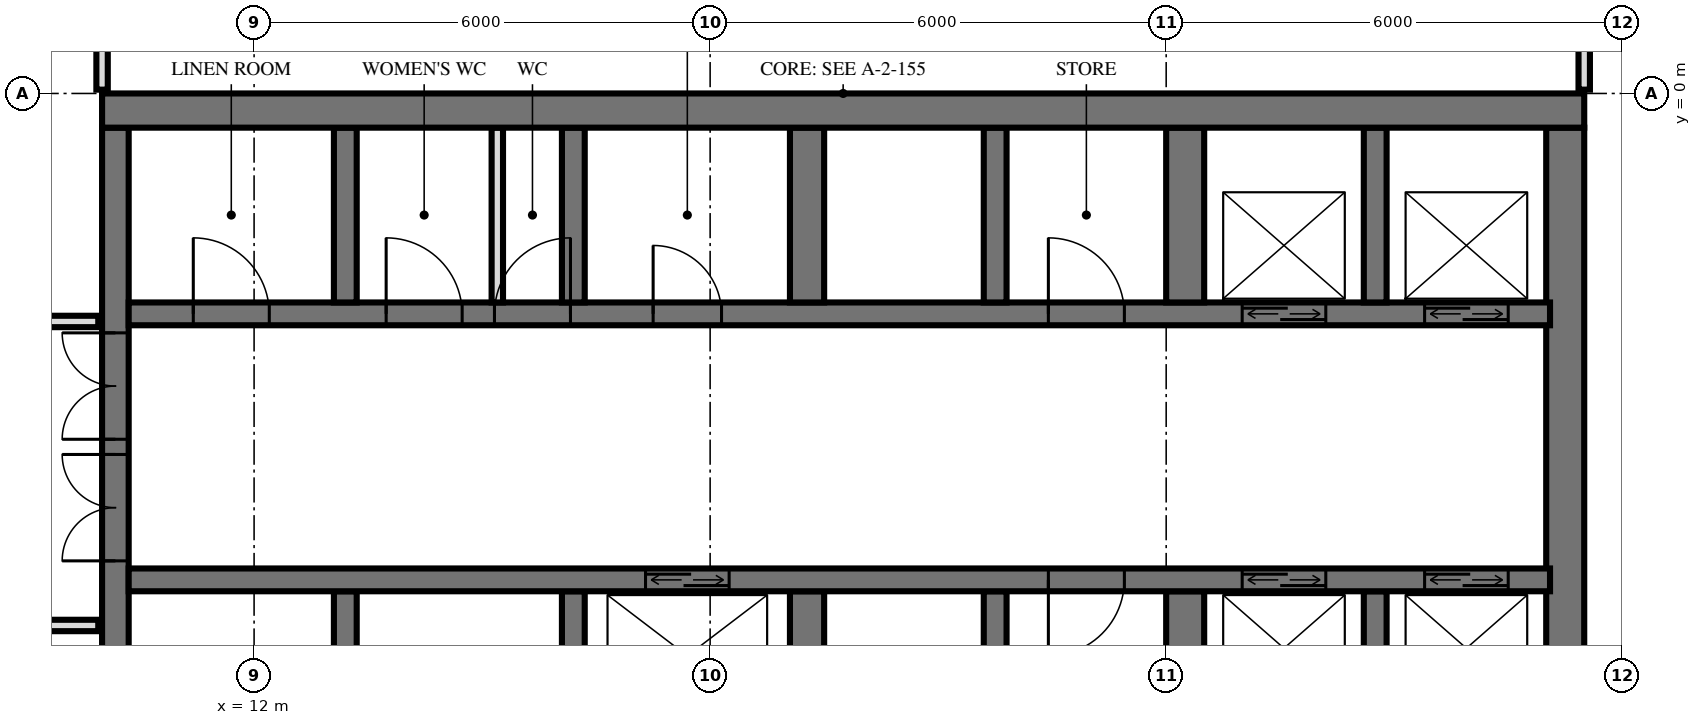
"""IFC4 building model, lengths in metres.
Left out: names, types, materials, properties, quantities, classifications, styles, units other than length and angle.
Written with IfcOpenShell. Run it as: python <this file> out.ifc"""

import sys

from ifc_helpers import new_model, si_unit, direction, frame, frame_2d, origin, place, context, subcontext, project, spatial, rectangle, extrude, element, fill, save


model = new_model("IFC4")
c1 = context("Model", 3, precision=1e-05, world=origin(), true_north=direction((0.0, 1.0)))
c2 = subcontext(c1, "Body", "Model", "MODEL_VIEW")
j1 = project(units=[si_unit("LENGTHUNIT", "METRE"), si_unit("PLANEANGLEUNIT", "RADIAN")], contexts=[c1])
p1 = place(None, origin())
s1 = spatial("IfcSite", under=j1, at=p1, CompositionType="ELEMENT")
p2 = place(p1, origin())
s2 = spatial("IfcBuilding", under=s1, at=p2, CompositionType="ELEMENT")
p3 = place(p2, frame((0.0, 0.0, 92.4)))
s3 = spatial("IfcBuildingStorey", under=s2, at=p3, CompositionType="ELEMENT", Elevation=92.4)
p4 = place(p3, frame((10.0, -0.225, 0.0), z_axis=(0.0, 0.0, 1.0), x_axis=(1.0, 0.0, 0.0)))
e1 = element("IfcWall", 1, at=p4, inside=s3, PredefinedType="SHEAR", context=c2, shape_type="SweptSolid", body=[
    extrude(rectangle(XDim=19.5, YDim=0.45, at=frame_2d((9.75, 0.0))), origin(), (0.0, 0.0, 1.0), 3.6),
])
p5 = place(p3, frame((10.175, -14.55, 0.0), z_axis=(0.0, 0.0, 1.0), x_axis=(0.0, 1.0, 0.0)))
e2 = element("IfcWall", 2, at=p5, inside=s3, PredefinedType="SHEAR", context=c2, shape_type="SweptSolid", body=[
    extrude(rectangle(XDim=14.1, YDim=0.35, at=frame_2d((7.05, 0.0))), origin(), (0.0, 0.0, 1.0), 3.6),
])
p6 = place(p5, frame((8.4, 0.0, 0.0)))
e3 = element("IfcOpeningElement", 3, at=p6, cuts=e2, PredefinedType="OPENING", context=c2, shape_type="SweptSolid", body=[
    extrude(rectangle(XDim=1.4, YDim=2.4, at=frame_2d((0.7, 1.2))), frame((0.0, 0.185, 0.0), z_axis=(0.0, -1.0, 0.0), x_axis=(1.0, 0.0, 0.0)), (0.0, 0.0, 1.0), 0.37),
])
p7 = place(p5, frame((10.0, 0.0, 0.0)))
e4 = element("IfcOpeningElement", 4, at=p7, cuts=e2, PredefinedType="OPENING", context=c2, shape_type="SweptSolid", body=[
    extrude(rectangle(XDim=1.4, YDim=2.4, at=frame_2d((0.7, 1.2))), frame((0.0, 0.185, 0.0), z_axis=(0.0, -1.0, 0.0), x_axis=(1.0, 0.0, 0.0)), (0.0, 0.0, 1.0), 0.37),
])
p8 = place(p5, frame((4.0, 0.0, 0.0)))
e5 = element("IfcOpeningElement", 5, at=p8, cuts=e2, PredefinedType="OPENING", context=c2, shape_type="SweptSolid", body=[
    extrude(rectangle(XDim=1.2, YDim=2.1, at=frame_2d((0.6, 1.05))), frame((0.0, 0.185, 0.0), z_axis=(0.0, -1.0, 0.0), x_axis=(1.0, 0.0, 0.0)), (0.0, 0.0, 1.0), 0.37),
])
p9 = place(p3, frame((29.25, -14.55, 0.0), z_axis=(0.0, 0.0, 1.0), x_axis=(0.0, 1.0, 0.0)))
e6 = element("IfcWall", 6, at=p9, inside=s3, PredefinedType="SHEAR", context=c2, shape_type="SweptSolid", body=[
    extrude(rectangle(XDim=14.1, YDim=0.5, at=frame_2d((7.05, 0.0))), origin(), (0.0, 0.0, 1.0), 3.6),
])
p10 = place(p3, frame((10.35, -2.9, 0.0), z_axis=(0.0, 0.0, 1.0), x_axis=(1.0, 0.0, 0.0)))
e7 = element("IfcWall", 7, at=p10, inside=s3, PredefinedType="SHEAR", context=c2, shape_type="SweptSolid", body=[
    extrude(rectangle(XDim=18.7, YDim=0.3, at=frame_2d((9.35, 0.0))), origin(), (0.0, 0.0, 1.0), 3.6),
])
p11 = place(p10, frame((14.65, 0.0, 0.0)))
e8 = element("IfcOpeningElement", 8, at=p11, cuts=e7, PredefinedType="OPENING", context=c2, shape_type="SweptSolid", body=[
    extrude(rectangle(XDim=1.1, YDim=2.1, at=frame_2d((0.55, 1.05))), frame((0.0, 0.16, 0.0), z_axis=(0.0, -1.0, 0.0), x_axis=(1.0, 0.0, 0.0)), (0.0, 0.0, 1.0), 0.32),
])
p12 = place(p10, frame((17.05, 0.0, 0.0)))
e9 = element("IfcOpeningElement", 9, at=p12, cuts=e7, PredefinedType="OPENING", context=c2, shape_type="SweptSolid", body=[
    extrude(rectangle(XDim=1.1, YDim=2.1, at=frame_2d((0.55, 1.05))), frame((0.0, 0.16, 0.0), z_axis=(0.0, -1.0, 0.0), x_axis=(1.0, 0.0, 0.0)), (0.0, 0.0, 1.0), 0.32),
])
p13 = place(p10, frame((6.9, 0.0, 0.0)))
e10 = element("IfcOpeningElement", 10, at=p13, cuts=e7, PredefinedType="OPENING", context=c2, shape_type="SweptSolid", body=[
    extrude(rectangle(XDim=0.9, YDim=2.1, at=frame_2d((0.45, 1.05))), frame((0.0, 0.16, 0.0), z_axis=(0.0, -1.0, 0.0), x_axis=(1.0, 0.0, 0.0)), (0.0, 0.0, 1.0), 0.32),
])
p14 = place(p10, frame((0.85, 0.0, 0.0)))
e11 = element("IfcOpeningElement", 11, at=p14, cuts=e7, PredefinedType="OPENING", context=c2, shape_type="SweptSolid", body=[
    extrude(rectangle(XDim=1.0, YDim=2.1, at=frame_2d((0.5, 1.05))), frame((0.0, 0.16, 0.0), z_axis=(0.0, -1.0, 0.0), x_axis=(1.0, 0.0, 0.0)), (0.0, 0.0, 1.0), 0.32),
])
p15 = place(p10, frame((3.387, 0.0, 0.0)))
e12 = element("IfcOpeningElement", 12, at=p15, cuts=e7, PredefinedType="OPENING", context=c2, shape_type="SweptSolid", body=[
    extrude(rectangle(XDim=1.0, YDim=2.1, at=frame_2d((0.5, 1.05))), frame((0.0, 0.16, 0.0), z_axis=(0.0, -1.0, 0.0), x_axis=(1.0, 0.0, 0.0)), (0.0, 0.0, 1.0), 0.32),
])
p16 = place(p10, frame((4.812, 0.0, 0.0)))
e13 = element("IfcOpeningElement", 13, at=p16, cuts=e7, PredefinedType="OPENING", context=c2, shape_type="SweptSolid", body=[
    extrude(rectangle(XDim=1.0, YDim=2.1, at=frame_2d((0.5, 1.05))), frame((0.0, 0.16, 0.0), z_axis=(0.0, -1.0, 0.0), x_axis=(1.0, 0.0, 0.0)), (0.0, 0.0, 1.0), 0.32),
])
p17 = place(p10, frame((12.1, 0.0, 0.0)))
e14 = element("IfcOpeningElement", 14, at=p17, cuts=e7, PredefinedType="OPENING", context=c2, shape_type="SweptSolid", body=[
    extrude(rectangle(XDim=1.0, YDim=2.1, at=frame_2d((0.5, 1.05))), frame((0.0, 0.16, 0.0), z_axis=(0.0, -1.0, 0.0), x_axis=(1.0, 0.0, 0.0)), (0.0, 0.0, 1.0), 0.32),
])
p18 = place(p3, frame((10.35, -6.4, 0.0), z_axis=(0.0, 0.0, 1.0), x_axis=(1.0, 0.0, 0.0)))
e15 = element("IfcWall", 15, at=p18, inside=s3, PredefinedType="SHEAR", context=c2, shape_type="SweptSolid", body=[
    extrude(rectangle(XDim=18.7, YDim=0.3, at=frame_2d((9.35, 0.0))), origin(), (0.0, 0.0, 1.0), 3.6),
])
p19 = place(p18, frame((14.65, 0.0, 0.0)))
e16 = element("IfcOpeningElement", 16, at=p19, cuts=e15, PredefinedType="OPENING", context=c2, shape_type="SweptSolid", body=[
    extrude(rectangle(XDim=1.1, YDim=2.1, at=frame_2d((0.55, 1.05))), frame((0.0, 0.16, 0.0), z_axis=(0.0, -1.0, 0.0), x_axis=(1.0, 0.0, 0.0)), (0.0, 0.0, 1.0), 0.32),
])
p20 = place(p18, frame((17.05, 0.0, 0.0)))
e17 = element("IfcOpeningElement", 17, at=p20, cuts=e15, PredefinedType="OPENING", context=c2, shape_type="SweptSolid", body=[
    extrude(rectangle(XDim=1.1, YDim=2.1, at=frame_2d((0.55, 1.05))), frame((0.0, 0.16, 0.0), z_axis=(0.0, -1.0, 0.0), x_axis=(1.0, 0.0, 0.0)), (0.0, 0.0, 1.0), 0.32),
])
p21 = place(p18, frame((6.8, 0.0, 0.0)))
e18 = element("IfcOpeningElement", 18, at=p21, cuts=e15, PredefinedType="OPENING", context=c2, shape_type="SweptSolid", body=[
    extrude(rectangle(XDim=1.1, YDim=2.1, at=frame_2d((0.55, 1.05))), frame((0.0, 0.16, 0.0), z_axis=(0.0, -1.0, 0.0), x_axis=(1.0, 0.0, 0.0)), (0.0, 0.0, 1.0), 0.32),
])
p22 = place(p18, frame((12.1, 0.0, 0.0)))
e19 = element("IfcOpeningElement", 19, at=p22, cuts=e15, PredefinedType="OPENING", context=c2, shape_type="SweptSolid", body=[
    extrude(rectangle(XDim=1.0, YDim=2.1, at=frame_2d((0.5, 1.05))), frame((0.0, 0.16, 0.0), z_axis=(0.0, -1.0, 0.0), x_axis=(1.0, 0.0, 0.0)), (0.0, 0.0, 1.0), 0.32),
])
for number, where, z_axis, x_axis in (
    (20, (13.2, -2.75, 0.0), (0.0, 0.0, 1.0), (0.0, 1.0, 0.0)),
    (21, (13.2, -8.85, 0.0), (0.0, 0.0, 1.0), (0.0, 1.0, 0.0)),
    (22, (16.2, -2.75, 0.0), (0.0, 0.0, 1.0), (0.0, 1.0, 0.0)),
    (23, (16.2, -8.85, 0.0), (0.0, 0.0, 1.0), (0.0, 1.0, 0.0)),
):
    element("IfcWall", number, at=place(p3, frame(where, z_axis=z_axis, x_axis=x_axis)), inside=s3, PredefinedType="SHEAR", context=c2, shape_type="SweptSolid", body=[
        extrude(rectangle(XDim=2.3, YDim=0.3, at=frame_2d((1.15, 0.0))), origin(), (0.0, 0.0, 1.0), 3.6),
    ])
for number, where, z_axis, x_axis in (
    (24, (19.275, -2.75, 0.0), (0.0, 0.0, 1.0), (0.0, 1.0, 0.0)),
    (25, (19.275, -8.85, 0.0), (0.0, 0.0, 1.0), (0.0, 1.0, 0.0)),
):
    element("IfcWall", number, at=place(p3, frame(where, z_axis=z_axis, x_axis=x_axis)), inside=s3, PredefinedType="SHEAR", context=c2, shape_type="SweptSolid", body=[
        extrude(rectangle(XDim=2.3, YDim=0.45, at=frame_2d((1.15, 0.0))), origin(), (0.0, 0.0, 1.0), 3.6),
    ])
for number, where, z_axis, x_axis in (
    (26, (21.75, -2.75, 0.0), (0.0, 0.0, 1.0), (0.0, 1.0, 0.0)),
    (27, (21.75, -8.85, 0.0), (0.0, 0.0, 1.0), (0.0, 1.0, 0.0)),
):
    element("IfcWall", number, at=place(p3, frame(where, z_axis=z_axis, x_axis=x_axis)), inside=s3, PredefinedType="SHEAR", context=c2, shape_type="SweptSolid", body=[
        extrude(rectangle(XDim=2.3, YDim=0.3, at=frame_2d((1.15, 0.0))), origin(), (0.0, 0.0, 1.0), 3.6),
    ])
for number, where, z_axis, x_axis in (
    (28, (24.25, -2.75, 0.0), (0.0, 0.0, 1.0), (0.0, 1.0, 0.0)),
    (29, (24.25, -8.85, 0.0), (0.0, 0.0, 1.0), (0.0, 1.0, 0.0)),
):
    element("IfcWall", number, at=place(p3, frame(where, z_axis=z_axis, x_axis=x_axis)), inside=s3, PredefinedType="SHEAR", context=c2, shape_type="SweptSolid", body=[
        extrude(rectangle(XDim=2.3, YDim=0.5, at=frame_2d((1.15, 0.0))), origin(), (0.0, 0.0, 1.0), 3.6),
    ])
for number, where, z_axis, x_axis in (
    (30, (26.75, -2.75, 0.0), (0.0, 0.0, 1.0), (0.0, 1.0, 0.0)),
    (31, (26.75, -8.85, 0.0), (0.0, 0.0, 1.0), (0.0, 1.0, 0.0)),
):
    element("IfcWall", number, at=place(p3, frame(where, z_axis=z_axis, x_axis=x_axis)), inside=s3, PredefinedType="SHEAR", context=c2, shape_type="SweptSolid", body=[
        extrude(rectangle(XDim=2.3, YDim=0.3, at=frame_2d((1.15, 0.0))), origin(), (0.0, 0.0, 1.0), 3.6),
    ])
p23 = place(p3, frame((15.2, -2.75, 0.0), z_axis=(0.0, 0.0, 1.0), x_axis=(0.0, 1.0, 0.0)))
e32 = element("IfcWall", 32, at=p23, inside=s3, PredefinedType="PARTITIONING", context=c2, shape_type="SweptSolid", body=[
    extrude(rectangle(XDim=2.3, YDim=0.15, at=frame_2d((1.15, 0.0))), origin(), (0.0, 0.0, 1.0), 3.3),
])
p24 = place(p3, frame((29.5, 0.05, 0.0), z_axis=(0.0, 0.0, 1.0), x_axis=(0.0, 1.0, 0.0)))
e33 = element("IfcWall", 33, at=p24, inside=s3, PredefinedType="PARTITIONING", context=c2, shape_type="SweptSolid", body=[
    extrude(rectangle(XDim=0.827, YDim=0.15, at=frame_2d((0.414, 0.0))), origin(), (0.0, 0.0, 1.0), 3.32),
])
p25 = place(p3, frame((10.0, 0.05, 0.0), z_axis=(0.0, 0.0, 1.0), x_axis=(0.0, 1.0, 0.0)))
e34 = element("IfcWall", 34, at=p25, inside=s3, PredefinedType="PARTITIONING", context=c2, shape_type="SweptSolid", body=[
    extrude(rectangle(XDim=0.97, YDim=0.15, at=frame_2d((0.485, 0.0))), origin(), (0.0, 0.0, 1.0), 3.32),
])
p26 = place(p3, frame((-9.95, -7.0, 0.0), z_axis=(0.0, 0.0, 1.0), x_axis=(1.0, 0.0, 0.0)))
e35 = element("IfcWall", 35, at=p26, inside=s3, PredefinedType="PARTITIONING", context=c2, shape_type="SweptSolid", body=[
    extrude(rectangle(XDim=19.9, YDim=0.15, at=frame_2d((9.95, 0.0))), origin(), (0.0, 0.0, 1.0), 3.32),
])
p27 = place(p26, frame((9.45, 0.0, 0.0)))
e36 = element("IfcOpeningElement", 36, at=p27, cuts=e35, PredefinedType="OPENING", context=c2, shape_type="SweptSolid", body=[
    extrude(rectangle(XDim=1.0, YDim=2.1, at=frame_2d((0.5, 1.05))), frame((0.0, 0.085, 0.0), z_axis=(0.0, -1.0, 0.0), x_axis=(1.0, 0.0, 0.0)), (0.0, 0.0, 1.0), 0.17),
])
p28 = place(p26, frame((3.45, 0.0, 0.0)))
e37 = element("IfcOpeningElement", 37, at=p28, cuts=e35, PredefinedType="OPENING", context=c2, shape_type="SweptSolid", body=[
    extrude(rectangle(XDim=1.0, YDim=2.1, at=frame_2d((0.5, 1.05))), frame((0.0, 0.085, 0.0), z_axis=(0.0, -1.0, 0.0), x_axis=(1.0, 0.0, 0.0)), (0.0, 0.0, 1.0), 0.17),
])
p29 = place(p3, frame((-9.95, -3.0, 0.0), z_axis=(0.0, 0.0, 1.0), x_axis=(1.0, 0.0, 0.0)))
e38 = element("IfcWall", 38, at=p29, inside=s3, PredefinedType="PARTITIONING", context=c2, shape_type="SweptSolid", body=[
    extrude(rectangle(XDim=19.9, YDim=0.15, at=frame_2d((9.95, 0.0))), origin(), (0.0, 0.0, 1.0), 3.32),
])
p30 = place(p29, frame((0.95, 0.0, 0.0)))
e39 = element("IfcOpeningElement", 39, at=p30, cuts=e38, PredefinedType="OPENING", context=c2, shape_type="SweptSolid", body=[
    extrude(rectangle(XDim=1.0, YDim=2.1, at=frame_2d((0.5, 1.05))), frame((0.0, 0.085, 0.0), z_axis=(0.0, -1.0, 0.0), x_axis=(1.0, 0.0, 0.0)), (0.0, 0.0, 1.0), 0.17),
])
p31 = place(p29, frame((3.7, 0.0, 0.0)))
e40 = element("IfcOpeningElement", 40, at=p31, cuts=e38, PredefinedType="OPENING", context=c2, shape_type="SweptSolid", body=[
    extrude(rectangle(XDim=1.0, YDim=2.1, at=frame_2d((0.5, 1.05))), frame((0.0, 0.085, 0.0), z_axis=(0.0, -1.0, 0.0), x_axis=(1.0, 0.0, 0.0)), (0.0, 0.0, 1.0), 0.17),
])
p32 = place(p29, frame((6.7, 0.0, 0.0)))
e41 = element("IfcOpeningElement", 41, at=p32, cuts=e38, PredefinedType="OPENING", context=c2, shape_type="SweptSolid", body=[
    extrude(rectangle(XDim=1.0, YDim=2.1, at=frame_2d((0.5, 1.05))), frame((0.0, 0.085, 0.0), z_axis=(0.0, -1.0, 0.0), x_axis=(1.0, 0.0, 0.0)), (0.0, 0.0, 1.0), 0.17),
])
p33 = place(p29, frame((13.95, 0.0, 0.0)))
e42 = element("IfcOpeningElement", 42, at=p33, cuts=e38, PredefinedType="OPENING", context=c2, shape_type="SweptSolid", body=[
    extrude(rectangle(XDim=1.0, YDim=2.1, at=frame_2d((0.5, 1.05))), frame((0.0, 0.085, 0.0), z_axis=(0.0, -1.0, 0.0), x_axis=(1.0, 0.0, 0.0)), (0.0, 0.0, 1.0), 0.17),
])
p34 = place(p11, origin())
e43 = element("IfcDoor", 43, at=p34, inside=s3, OperationType="DOUBLE_DOOR_SLIDING", PredefinedType="USERDEFINED", context=c2, shape_type="SweptSolid", body=[
    extrude(rectangle(XDim=1.1, YDim=2.1, at=frame_2d((0.55, 1.05))), frame((0.0, 0.025, 0.0), z_axis=(0.0, -1.0, 0.0), x_axis=(1.0, 0.0, 0.0)), (0.0, 0.0, 1.0), 0.05),
])
fill(e8, e43)
p35 = place(p12, origin())
e44 = element("IfcDoor", 44, at=p35, inside=s3, OperationType="DOUBLE_DOOR_SLIDING", PredefinedType="USERDEFINED", context=c2, shape_type="SweptSolid", body=[
    extrude(rectangle(XDim=1.1, YDim=2.1, at=frame_2d((0.55, 1.05))), frame((0.0, 0.025, 0.0), z_axis=(0.0, -1.0, 0.0), x_axis=(1.0, 0.0, 0.0)), (0.0, 0.0, 1.0), 0.05),
])
fill(e9, e44)
p36 = place(p19, origin())
e45 = element("IfcDoor", 45, at=p36, inside=s3, OperationType="DOUBLE_DOOR_SLIDING", PredefinedType="USERDEFINED", context=c2, shape_type="SweptSolid", body=[
    extrude(rectangle(XDim=1.1, YDim=2.1, at=frame_2d((0.55, 1.05))), frame((0.0, 0.025, 0.0), z_axis=(0.0, -1.0, 0.0), x_axis=(1.0, 0.0, 0.0)), (0.0, 0.0, 1.0), 0.05),
])
fill(e16, e45)
p37 = place(p20, origin())
e46 = element("IfcDoor", 46, at=p37, inside=s3, OperationType="DOUBLE_DOOR_SLIDING", PredefinedType="USERDEFINED", context=c2, shape_type="SweptSolid", body=[
    extrude(rectangle(XDim=1.1, YDim=2.1, at=frame_2d((0.55, 1.05))), frame((0.0, 0.025, 0.0), z_axis=(0.0, -1.0, 0.0), x_axis=(1.0, 0.0, 0.0)), (0.0, 0.0, 1.0), 0.05),
])
fill(e17, e46)
p38 = place(p21, origin())
e47 = element("IfcDoor", 47, at=p38, inside=s3, OperationType="DOUBLE_DOOR_SLIDING", PredefinedType="USERDEFINED", context=c2, shape_type="SweptSolid", body=[
    extrude(rectangle(XDim=1.1, YDim=2.1, at=frame_2d((0.55, 1.05))), frame((0.0, 0.025, 0.0), z_axis=(0.0, -1.0, 0.0), x_axis=(1.0, 0.0, 0.0)), (0.0, 0.0, 1.0), 0.05),
])
fill(e18, e47)
p39 = place(p6, origin())
e48 = element("IfcDoor", 48, at=p39, inside=s3, OperationType="DOUBLE_DOOR_SINGLE_SWING", PredefinedType="DOOR", context=c2, shape_type="SweptSolid", body=[
    extrude(rectangle(XDim=1.4, YDim=2.4, at=frame_2d((0.7, 1.2))), frame((0.0, 0.025, 0.0), z_axis=(0.0, -1.0, 0.0), x_axis=(1.0, 0.0, 0.0)), (0.0, 0.0, 1.0), 0.05),
])
fill(e3, e48)
p40 = place(p7, origin())
e49 = element("IfcDoor", 49, at=p40, inside=s3, OperationType="DOUBLE_DOOR_SINGLE_SWING", PredefinedType="DOOR", context=c2, shape_type="SweptSolid", body=[
    extrude(rectangle(XDim=1.4, YDim=2.4, at=frame_2d((0.7, 1.2))), frame((0.0, 0.025, 0.0), z_axis=(0.0, -1.0, 0.0), x_axis=(1.0, 0.0, 0.0)), (0.0, 0.0, 1.0), 0.05),
])
fill(e4, e49)
p41 = place(p13, origin())
e50 = element("IfcDoor", 50, at=p41, inside=s3, OperationType="SINGLE_SWING_RIGHT", PredefinedType="DOOR", context=c2, shape_type="SweptSolid", body=[
    extrude(rectangle(XDim=0.9, YDim=2.1, at=frame_2d((0.45, 1.05))), frame((0.0, 0.025, 0.0), z_axis=(0.0, -1.0, 0.0), x_axis=(1.0, 0.0, 0.0)), (0.0, 0.0, 1.0), 0.05),
])
fill(e10, e50)
p42 = place(p14, origin())
e51 = element("IfcDoor", 51, at=p42, inside=s3, OperationType="SINGLE_SWING_RIGHT", PredefinedType="DOOR", context=c2, shape_type="SweptSolid", body=[
    extrude(rectangle(XDim=1.0, YDim=2.1, at=frame_2d((0.5, 1.05))), frame((0.0, 0.025, 0.0), z_axis=(0.0, -1.0, 0.0), x_axis=(1.0, 0.0, 0.0)), (0.0, 0.0, 1.0), 0.05),
])
fill(e11, e51)
p43 = place(p15, origin())
e52 = element("IfcDoor", 52, at=p43, inside=s3, OperationType="SINGLE_SWING_RIGHT", PredefinedType="DOOR", context=c2, shape_type="SweptSolid", body=[
    extrude(rectangle(XDim=1.0, YDim=2.1, at=frame_2d((0.5, 1.05))), frame((0.0, 0.025, 0.0), z_axis=(0.0, -1.0, 0.0), x_axis=(1.0, 0.0, 0.0)), (0.0, 0.0, 1.0), 0.05),
])
fill(e12, e52)
p44 = place(p16, origin())
e53 = element("IfcDoor", 53, at=p44, inside=s3, OperationType="SINGLE_SWING_LEFT", PredefinedType="DOOR", context=c2, shape_type="SweptSolid", body=[
    extrude(rectangle(XDim=1.0, YDim=2.1, at=frame_2d((0.5, 1.05))), frame((0.0, 0.025, 0.0), z_axis=(0.0, -1.0, 0.0), x_axis=(1.0, 0.0, 0.0)), (0.0, 0.0, 1.0), 0.05),
])
fill(e13, e53)
p45 = place(p17, origin())
e54 = element("IfcDoor", 54, at=p45, inside=s3, OperationType="SINGLE_SWING_RIGHT", PredefinedType="DOOR", context=c2, shape_type="SweptSolid", body=[
    extrude(rectangle(XDim=1.0, YDim=2.1, at=frame_2d((0.5, 1.05))), frame((0.0, 0.025, 0.0), z_axis=(0.0, -1.0, 0.0), x_axis=(1.0, 0.0, 0.0)), (0.0, 0.0, 1.0), 0.05),
])
fill(e14, e54)
p46 = place(p22, frame((0.5, 0.0, 0.0), z_axis=(0.0, 0.0, 1.0), x_axis=(-1.0, 0.0, 0.0)))
e55 = element("IfcDoor", 55, at=p46, inside=s3, OperationType="SINGLE_SWING_LEFT", PredefinedType="DOOR", context=c2, shape_type="SweptSolid", body=[
    extrude(rectangle(XDim=1.0, YDim=2.1, at=frame_2d((0.0, 1.05))), frame((0.0, -0.025, 0.0), z_axis=(0.0, 1.0, 0.0), x_axis=(-1.0, 0.0, 0.0)), (0.0, 0.0, 1.0), 0.05),
])
fill(e19, e55)
save(model, sys.argv[1])
